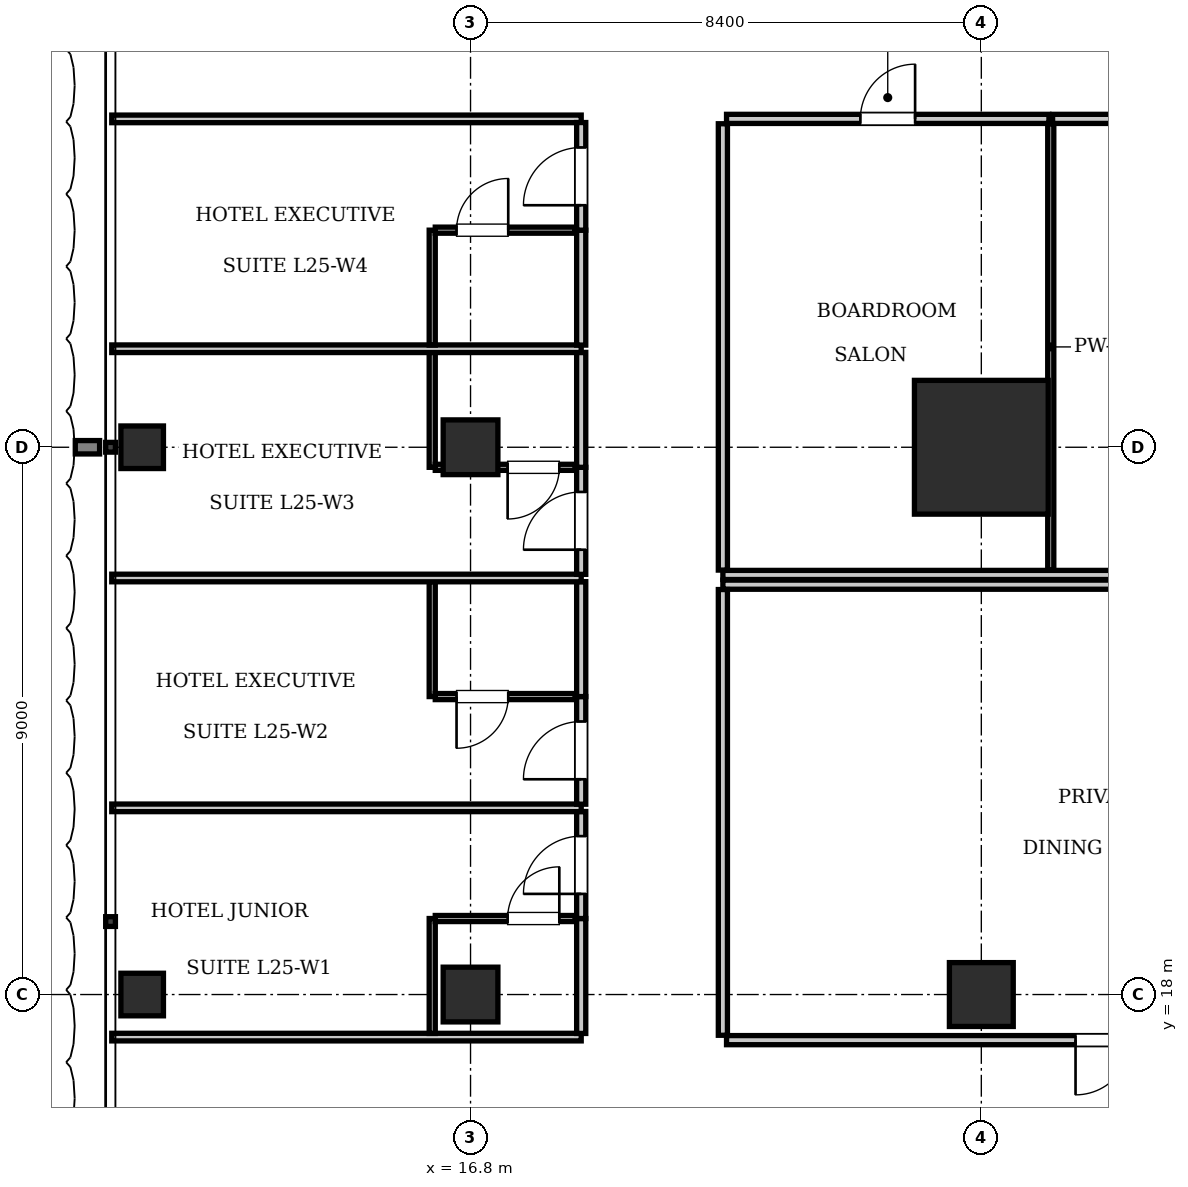
"""IFC4 building model, lengths in metres.
Left out: names, types, materials, properties, quantities, classifications, styles, units other than length and angle.
Written with IfcOpenShell. Run it as: python <this file> out.ifc"""

import sys

from ifc_helpers import new_model, si_unit, direction, frame, frame_2d, origin, origin_2d, place, context, subcontext, project, spatial, rectangle, i_section, extrude, element, fill, save


model = new_model("IFC4")
c1 = context("Model", 3, precision=1e-05, world=origin(), true_north=direction((0.0, 1.0)))
c2 = subcontext(c1, "Body", "Model", "MODEL_VIEW")
j1 = project(units=[si_unit("LENGTHUNIT", "METRE"), si_unit("PLANEANGLEUNIT", "RADIAN")], contexts=[c1])
p1 = place(None, origin())
s1 = spatial("IfcSite", under=j1, at=p1, CompositionType="ELEMENT")
p2 = place(p1, origin())
s2 = spatial("IfcBuilding", under=s1, at=p2, CompositionType="ELEMENT")
p3 = place(p2, frame((0.0, 0.0, 103.95)))
s3 = spatial("IfcBuildingStorey", under=s2, at=p3, CompositionType="ELEMENT", Elevation=103.95)
p4 = place(p3, frame((25.2, 27.0, 0.0), z_axis=(0.0, 0.0, 1.0), x_axis=(1.0, 0.0, 0.0)))
e1 = element("IfcColumn", 1, at=p4, inside=s3, PredefinedType="COLUMN", context=c2, shape_type="SweptSolid", body=[
    extrude(rectangle(XDim=2.2, YDim=2.2, at=origin_2d()), origin(), (0.0, 0.0, 1.0), 3.85),
])
p5 = place(p3, frame((25.2, 18.0, 0.0), z_axis=(0.0, 0.0, 1.0), x_axis=(1.0, 0.0, 0.0)))
e2 = element("IfcColumn", 2, at=p5, inside=s3, PredefinedType="COLUMN", context=c2, shape_type="SweptSolid", body=[
    extrude(rectangle(XDim=1.05, YDim=1.05, at=origin_2d()), origin(), (0.0, 0.0, 1.0), 3.85),
])
for number, where, z_axis, x_axis in (
    (3, (16.8, 18.0, 0.0), (0.0, 0.0, 1.0), (1.0, 0.0, 0.0)),
    (4, (16.8, 27.0, 0.0), (0.0, 0.0, 1.0), (1.0, 0.0, 0.0)),
):
    element("IfcColumn", number, at=place(p3, frame(where, z_axis=z_axis, x_axis=x_axis)), inside=s3, PredefinedType="COLUMN", context=c2, shape_type="SweptSolid", body=[
        extrude(rectangle(XDim=0.9, YDim=0.9, at=origin_2d()), origin(), (0.0, 0.0, 1.0), 3.85),
    ])
for number, where, z_axis, x_axis in (
    (5, (11.4, 18.0, 0.0), (0.0, 0.0, 1.0), (1.0, 0.0, 0.0)),
    (6, (11.4, 27.0, 0.0), (0.0, 0.0, 1.0), (1.0, 0.0, 0.0)),
):
    element("IfcColumn", number, at=place(p3, frame(where, z_axis=z_axis, x_axis=x_axis)), inside=s3, PredefinedType="COLUMN", context=c2, shape_type="SweptSolid", body=[
        extrude(i_section(OverallWidth=0.7, OverallDepth=0.7, WebThickness=0.028, FlangeThickness=0.044, at=origin_2d()), origin(), (0.0, 0.0, 1.0), 3.85),
    ])
p6 = place(p3, frame((20.95, 24.9, 0.0), z_axis=(0.0, 0.0, 1.0), x_axis=(1.0, 0.0, 0.0)))
e7 = element("IfcWall", 7, at=p6, inside=s3, PredefinedType="PARTITIONING", context=c2, shape_type="SweptSolid", body=[
    extrude(rectangle(XDim=33.7, YDim=0.15, at=frame_2d((16.85, 0.0))), origin(), (0.0, 0.0, 1.0), 3.61),
])
p7 = place(p3, frame((20.95, 24.98, 0.0), z_axis=(0.0, 0.0, 1.0), x_axis=(0.0, 1.0, 0.0)))
e8 = element("IfcWall", 8, at=p7, inside=s3, PredefinedType="PARTITIONING", context=c2, shape_type="SweptSolid", body=[
    extrude(rectangle(XDim=7.34, YDim=0.15, at=frame_2d((3.67, 0.0))), origin(), (0.0, 0.0, 1.0), 3.293),
])
p8 = place(p3, frame((21.01, 32.4, 0.0), z_axis=(0.0, 0.0, 1.0), x_axis=(1.0, 0.0, 0.0)))
e9 = element("IfcWall", 9, at=p8, inside=s3, PredefinedType="PARTITIONING", context=c2, shape_type="SweptSolid", body=[
    extrude(rectangle(XDim=5.302, YDim=0.15, at=frame_2d((2.651, 0.0))), origin(), (0.0, 0.0, 1.0), 3.61),
])
p9 = place(p8, frame((2.201, 0.0, 0.0)))
e10 = element("IfcOpeningElement", 10, at=p9, cuts=e9, PredefinedType="OPENING", context=c2, shape_type="SweptSolid", body=[
    extrude(rectangle(XDim=0.9, YDim=2.1, at=frame_2d((0.45, 1.05))), frame((0.0, 0.085, 0.0), z_axis=(0.0, -1.0, 0.0), x_axis=(1.0, 0.0, 0.0)), (0.0, 0.0, 1.0), 0.17),
])
p10 = place(p3, frame((26.342, 24.98, 0.0), z_axis=(0.0, 0.0, 1.0), x_axis=(0.0, 1.0, 0.0)))
e11 = element("IfcWall", 11, at=p10, inside=s3, PredefinedType="PARTITIONING", context=c2, shape_type="SweptSolid", body=[
    extrude(rectangle(XDim=7.34, YDim=0.1, at=frame_2d((3.67, 0.0))), origin(), (0.0, 0.0, 1.0), 3.61),
])
p11 = place(p3, frame((26.372, 32.4, 0.0), z_axis=(0.0, 0.0, 1.0), x_axis=(1.0, 0.0, 0.0)))
e12 = element("IfcWall", 12, at=p11, inside=s3, PredefinedType="PARTITIONING", context=c2, shape_type="SweptSolid", body=[
    extrude(rectangle(XDim=7.354, YDim=0.15, at=frame_2d((3.677, 0.0))), origin(), (0.0, 0.0, 1.0), 3.61),
])
p12 = place(p11, frame((3.227, 0.0, 0.0)))
e13 = element("IfcOpeningElement", 13, at=p12, cuts=e12, PredefinedType="OPENING", context=c2, shape_type="SweptSolid", body=[
    extrude(rectangle(XDim=0.9, YDim=2.1, at=frame_2d((0.45, 1.05))), frame((0.0, 0.085, 0.0), z_axis=(0.0, -1.0, 0.0), x_axis=(1.0, 0.0, 0.0)), (0.0, 0.0, 1.0), 0.17),
])
p13 = place(p3, frame((20.95, 24.74, 0.0), z_axis=(0.0, 0.0, 1.0), x_axis=(1.0, 0.0, 0.0)))
e14 = element("IfcWall", 14, at=p13, inside=s3, PredefinedType="PARTITIONING", context=c2, shape_type="SweptSolid", body=[
    extrude(rectangle(XDim=33.7, YDim=0.15, at=frame_2d((16.85, 0.0))), origin(), (0.0, 0.0, 1.0), 3.61),
])
p14 = place(p3, frame((20.95, 17.33, 0.0), z_axis=(0.0, 0.0, 1.0), x_axis=(0.0, 1.0, 0.0)))
e15 = element("IfcWall", 15, at=p14, inside=s3, PredefinedType="PARTITIONING", context=c2, shape_type="SweptSolid", body=[
    extrude(rectangle(XDim=7.33, YDim=0.15, at=frame_2d((3.665, 0.0))), origin(), (0.0, 0.0, 1.0), 3.255),
])
p15 = place(p3, frame((21.01, 17.25, 0.0), z_axis=(0.0, 0.0, 1.0), x_axis=(1.0, 0.0, 0.0)))
e16 = element("IfcWall", 16, at=p15, inside=s3, PredefinedType="PARTITIONING", context=c2, shape_type="SweptSolid", body=[
    extrude(rectangle(XDim=12.379, YDim=0.15, at=frame_2d((6.189, 0.0))), origin(), (0.0, 0.0, 1.0), 3.61),
])
p16 = place(p15, frame((5.74, 0.0, 0.0)))
e17 = element("IfcOpeningElement", 17, at=p16, cuts=e16, PredefinedType="OPENING", context=c2, shape_type="SweptSolid", body=[
    extrude(rectangle(XDim=0.9, YDim=2.1, at=frame_2d((0.45, 1.05))), frame((0.0, 0.085, 0.0), z_axis=(0.0, -1.0, 0.0), x_axis=(1.0, 0.0, 0.0)), (0.0, 0.0, 1.0), 0.17),
])
for number, where, z_axis, x_axis in (
    (18, (10.9, 17.3, 0.0), (0.0, 0.0, 1.0), (1.0, 0.0, 0.0)),
    (19, (10.9, 32.4, 0.0), (0.0, 0.0, 1.0), (1.0, 0.0, 0.0)),
):
    element("IfcWall", number, at=place(p3, frame(where, z_axis=z_axis, x_axis=x_axis)), inside=s3, PredefinedType="PARTITIONING", context=c2, shape_type="SweptSolid", body=[
        extrude(rectangle(XDim=7.72, YDim=0.125, at=frame_2d((3.86, 0.0))), origin(), (0.0, 0.0, 1.0), 3.61),
    ])
p17 = place(p3, frame((18.62, 17.36, 0.0), z_axis=(0.0, 0.0, 1.0), x_axis=(0.0, 1.0, 0.0)))
e20 = element("IfcWall", 20, at=p17, inside=s3, PredefinedType="PARTITIONING", context=c2, shape_type="SweptSolid", body=[
    extrude(rectangle(XDim=1.89, YDim=0.15, at=frame_2d((0.945, 0.0))), origin(), (0.0, 0.0, 1.0), 3.61),
])
p18 = place(p3, frame((18.62, 19.25, 0.0), z_axis=(0.0, 0.0, 1.0), x_axis=(0.0, 1.0, 0.0)))
e21 = element("IfcWall", 21, at=p18, inside=s3, PredefinedType="PARTITIONING", context=c2, shape_type="SweptSolid", body=[
    extrude(rectangle(XDim=1.76, YDim=0.15, at=frame_2d((0.88, 0.0))), origin(), (0.0, 0.0, 1.0), 3.61),
])
p19 = place(p18, frame((0.405, 0.0, 0.0)))
e22 = element("IfcOpeningElement", 22, at=p19, cuts=e21, PredefinedType="OPENING", context=c2, shape_type="SweptSolid", body=[
    extrude(rectangle(XDim=0.95, YDim=2.15, at=frame_2d((0.475, 1.075))), frame((0.0, 0.085, 0.0), z_axis=(0.0, -1.0, 0.0), x_axis=(1.0, 0.0, 0.0)), (0.0, 0.0, 1.0), 0.17),
])
p20 = place(p3, frame((16.17, 17.36, 0.0), z_axis=(0.0, 0.0, 1.0), x_axis=(0.0, 1.0, 0.0)))
e23 = element("IfcWall", 23, at=p20, inside=s3, PredefinedType="PARTITIONING", context=c2, shape_type="SweptSolid", body=[
    extrude(rectangle(XDim=1.89, YDim=0.1, at=frame_2d((0.945, 0.0))), origin(), (0.0, 0.0, 1.0), 3.61),
])
p21 = place(p3, frame((16.22, 19.25, 0.0), z_axis=(0.0, 0.0, 1.0), x_axis=(1.0, 0.0, 0.0)))
e24 = element("IfcWall", 24, at=p21, inside=s3, PredefinedType="PARTITIONING", context=c2, shape_type="SweptSolid", body=[
    extrude(rectangle(XDim=2.3, YDim=0.1, at=frame_2d((1.15, 0.0))), origin(), (0.0, 0.0, 1.0), 3.61),
])
p22 = place(p21, frame((1.19, 0.0, 0.0)))
e25 = element("IfcOpeningElement", 25, at=p22, cuts=e24, PredefinedType="OPENING", context=c2, shape_type="SweptSolid", body=[
    extrude(rectangle(XDim=0.85, YDim=2.1, at=frame_2d((0.425, 1.05))), frame((0.0, 0.06, 0.0), z_axis=(0.0, -1.0, 0.0), x_axis=(1.0, 0.0, 0.0)), (0.0, 0.0, 1.0), 0.12),
])
p23 = place(p3, frame((10.9, 21.07, 0.0), z_axis=(0.0, 0.0, 1.0), x_axis=(1.0, 0.0, 0.0)))
e26 = element("IfcWall", 26, at=p23, inside=s3, PredefinedType="PARTITIONING", context=c2, shape_type="SweptSolid", body=[
    extrude(rectangle(XDim=7.72, YDim=0.125, at=frame_2d((3.86, 0.0))), origin(), (0.0, 0.0, 1.0), 3.61),
])
p24 = place(p3, frame((18.62, 21.13, 0.0), z_axis=(0.0, 0.0, 1.0), x_axis=(0.0, 1.0, 0.0)))
e27 = element("IfcWall", 27, at=p24, inside=s3, PredefinedType="PARTITIONING", context=c2, shape_type="SweptSolid", body=[
    extrude(rectangle(XDim=1.77, YDim=0.15, at=frame_2d((0.885, 0.0))), origin(), (0.0, 0.0, 1.0), 3.61),
])
p25 = place(p24, frame((0.41, 0.0, 0.0)))
e28 = element("IfcOpeningElement", 28, at=p25, cuts=e27, PredefinedType="OPENING", context=c2, shape_type="SweptSolid", body=[
    extrude(rectangle(XDim=0.95, YDim=2.15, at=frame_2d((0.475, 1.075))), frame((0.0, 0.085, 0.0), z_axis=(0.0, -1.0, 0.0), x_axis=(1.0, 0.0, 0.0)), (0.0, 0.0, 1.0), 0.17),
])
p26 = place(p3, frame((18.62, 22.9, 0.0), z_axis=(0.0, 0.0, 1.0), x_axis=(0.0, 1.0, 0.0)))
e29 = element("IfcWall", 29, at=p26, inside=s3, PredefinedType="PARTITIONING", context=c2, shape_type="SweptSolid", body=[
    extrude(rectangle(XDim=1.89, YDim=0.15, at=frame_2d((0.945, 0.0))), origin(), (0.0, 0.0, 1.0), 3.61),
])
p27 = place(p3, frame((16.17, 22.9, 0.0), z_axis=(0.0, 0.0, 1.0), x_axis=(0.0, 1.0, 0.0)))
e30 = element("IfcWall", 30, at=p27, inside=s3, PredefinedType="PARTITIONING", context=c2, shape_type="SweptSolid", body=[
    extrude(rectangle(XDim=1.89, YDim=0.1, at=frame_2d((0.945, 0.0))), origin(), (0.0, 0.0, 1.0), 3.61),
])
p28 = place(p3, frame((16.22, 22.9, 0.0), z_axis=(0.0, 0.0, 1.0), x_axis=(1.0, 0.0, 0.0)))
e31 = element("IfcWall", 31, at=p28, inside=s3, PredefinedType="PARTITIONING", context=c2, shape_type="SweptSolid", body=[
    extrude(rectangle(XDim=2.3, YDim=0.1, at=frame_2d((1.15, 0.0))), origin(), (0.0, 0.0, 1.0), 3.61),
])
p29 = place(p28, frame((0.35, 0.0, 0.0)))
e32 = element("IfcOpeningElement", 32, at=p29, cuts=e31, PredefinedType="OPENING", context=c2, shape_type="SweptSolid", body=[
    extrude(rectangle(XDim=0.85, YDim=2.1, at=frame_2d((0.425, 1.05))), frame((0.0, 0.06, 0.0), z_axis=(0.0, -1.0, 0.0), x_axis=(1.0, 0.0, 0.0)), (0.0, 0.0, 1.0), 0.12),
])
p30 = place(p3, frame((10.9, 24.85, 0.0), z_axis=(0.0, 0.0, 1.0), x_axis=(1.0, 0.0, 0.0)))
e33 = element("IfcWall", 33, at=p30, inside=s3, PredefinedType="PARTITIONING", context=c2, shape_type="SweptSolid", body=[
    extrude(rectangle(XDim=7.72, YDim=0.125, at=frame_2d((3.86, 0.0))), origin(), (0.0, 0.0, 1.0), 3.61),
])
p31 = place(p3, frame((18.62, 24.91, 0.0), z_axis=(0.0, 0.0, 1.0), x_axis=(0.0, 1.0, 0.0)))
e34 = element("IfcWall", 34, at=p31, inside=s3, PredefinedType="PARTITIONING", context=c2, shape_type="SweptSolid", body=[
    extrude(rectangle(XDim=1.76, YDim=0.15, at=frame_2d((0.88, 0.0))), origin(), (0.0, 0.0, 1.0), 3.61),
])
p32 = place(p31, frame((0.405, 0.0, 0.0)))
e35 = element("IfcOpeningElement", 35, at=p32, cuts=e34, PredefinedType="OPENING", context=c2, shape_type="SweptSolid", body=[
    extrude(rectangle(XDim=0.95, YDim=2.15, at=frame_2d((0.475, 1.075))), frame((0.0, 0.085, 0.0), z_axis=(0.0, -1.0, 0.0), x_axis=(1.0, 0.0, 0.0)), (0.0, 0.0, 1.0), 0.17),
])
p33 = place(p3, frame((18.62, 26.67, 0.0), z_axis=(0.0, 0.0, 1.0), x_axis=(0.0, 1.0, 0.0)))
e36 = element("IfcWall", 36, at=p33, inside=s3, PredefinedType="PARTITIONING", context=c2, shape_type="SweptSolid", body=[
    extrude(rectangle(XDim=1.89, YDim=0.15, at=frame_2d((0.945, 0.0))), origin(), (0.0, 0.0, 1.0), 3.61),
])
p34 = place(p3, frame((16.17, 26.67, 0.0), z_axis=(0.0, 0.0, 1.0), x_axis=(0.0, 1.0, 0.0)))
e37 = element("IfcWall", 37, at=p34, inside=s3, PredefinedType="PARTITIONING", context=c2, shape_type="SweptSolid", body=[
    extrude(rectangle(XDim=1.89, YDim=0.1, at=frame_2d((0.945, 0.0))), origin(), (0.0, 0.0, 1.0), 3.61),
])
p35 = place(p3, frame((16.22, 26.67, 0.0), z_axis=(0.0, 0.0, 1.0), x_axis=(1.0, 0.0, 0.0)))
e38 = element("IfcWall", 38, at=p35, inside=s3, PredefinedType="PARTITIONING", context=c2, shape_type="SweptSolid", body=[
    extrude(rectangle(XDim=2.3, YDim=0.1, at=frame_2d((1.15, 0.0))), origin(), (0.0, 0.0, 1.0), 3.61),
])
p36 = place(p35, frame((1.19, 0.0, 0.0)))
e39 = element("IfcOpeningElement", 39, at=p36, cuts=e38, PredefinedType="OPENING", context=c2, shape_type="SweptSolid", body=[
    extrude(rectangle(XDim=0.85, YDim=2.1, at=frame_2d((0.425, 1.05))), frame((0.0, 0.06, 0.0), z_axis=(0.0, -1.0, 0.0), x_axis=(1.0, 0.0, 0.0)), (0.0, 0.0, 1.0), 0.12),
])
p37 = place(p3, frame((10.9, 28.62, 0.0), z_axis=(0.0, 0.0, 1.0), x_axis=(1.0, 0.0, 0.0)))
e40 = element("IfcWall", 40, at=p37, inside=s3, PredefinedType="PARTITIONING", context=c2, shape_type="SweptSolid", body=[
    extrude(rectangle(XDim=7.72, YDim=0.125, at=frame_2d((3.86, 0.0))), origin(), (0.0, 0.0, 1.0), 3.61),
])
p38 = place(p3, frame((18.62, 28.68, 0.0), z_axis=(0.0, 0.0, 1.0), x_axis=(0.0, 1.0, 0.0)))
e41 = element("IfcWall", 41, at=p38, inside=s3, PredefinedType="PARTITIONING", context=c2, shape_type="SweptSolid", body=[
    extrude(rectangle(XDim=1.89, YDim=0.15, at=frame_2d((0.945, 0.0))), origin(), (0.0, 0.0, 1.0), 3.61),
])
p39 = place(p3, frame((18.62, 30.57, 0.0), z_axis=(0.0, 0.0, 1.0), x_axis=(0.0, 1.0, 0.0)))
e42 = element("IfcWall", 42, at=p39, inside=s3, PredefinedType="PARTITIONING", context=c2, shape_type="SweptSolid", body=[
    extrude(rectangle(XDim=1.77, YDim=0.15, at=frame_2d((0.885, 0.0))), origin(), (0.0, 0.0, 1.0), 3.61),
])
p40 = place(p39, frame((0.41, 0.0, 0.0)))
e43 = element("IfcOpeningElement", 43, at=p40, cuts=e42, PredefinedType="OPENING", context=c2, shape_type="SweptSolid", body=[
    extrude(rectangle(XDim=0.95, YDim=2.15, at=frame_2d((0.475, 1.075))), frame((0.0, 0.085, 0.0), z_axis=(0.0, -1.0, 0.0), x_axis=(1.0, 0.0, 0.0)), (0.0, 0.0, 1.0), 0.17),
])
p41 = place(p3, frame((16.17, 28.68, 0.0), z_axis=(0.0, 0.0, 1.0), x_axis=(0.0, 1.0, 0.0)))
e44 = element("IfcWall", 44, at=p41, inside=s3, PredefinedType="PARTITIONING", context=c2, shape_type="SweptSolid", body=[
    extrude(rectangle(XDim=1.89, YDim=0.1, at=frame_2d((0.945, 0.0))), origin(), (0.0, 0.0, 1.0), 3.61),
])
p42 = place(p3, frame((16.22, 30.57, 0.0), z_axis=(0.0, 0.0, 1.0), x_axis=(1.0, 0.0, 0.0)))
e45 = element("IfcWall", 45, at=p42, inside=s3, PredefinedType="PARTITIONING", context=c2, shape_type="SweptSolid", body=[
    extrude(rectangle(XDim=2.3, YDim=0.1, at=frame_2d((1.15, 0.0))), origin(), (0.0, 0.0, 1.0), 3.61),
])
p43 = place(p42, frame((0.35, 0.0, 0.0)))
e46 = element("IfcOpeningElement", 46, at=p43, cuts=e45, PredefinedType="OPENING", context=c2, shape_type="SweptSolid", body=[
    extrude(rectangle(XDim=0.85, YDim=2.1, at=frame_2d((0.425, 1.05))), frame((0.0, 0.06, 0.0), z_axis=(0.0, -1.0, 0.0), x_axis=(1.0, 0.0, 0.0)), (0.0, 0.0, 1.0), 0.12),
])
p44 = place(p9, origin())
e47 = element("IfcDoor", 47, at=p44, inside=s3, OperationType="SINGLE_SWING_RIGHT", PredefinedType="DOOR", context=c2, shape_type="SweptSolid", body=[
    extrude(rectangle(XDim=0.9, YDim=2.1, at=frame_2d((0.45, 1.05))), frame((0.0, 0.025, 0.0), z_axis=(0.0, -1.0, 0.0), x_axis=(1.0, 0.0, 0.0)), (0.0, 0.0, 1.0), 0.05),
])
fill(e10, e47)
p45 = place(p16, frame((0.9, 0.0, 0.0), z_axis=(0.0, 0.0, 1.0), x_axis=(-1.0, 0.0, 0.0)))
e48 = element("IfcDoor", 48, at=p45, inside=s3, OperationType="SINGLE_SWING_RIGHT", PredefinedType="DOOR", context=c2, shape_type="SweptSolid", body=[
    extrude(rectangle(XDim=0.9, YDim=2.1, at=frame_2d((0.45, 1.05))), frame((0.0, 0.025, 0.0), z_axis=(0.0, -1.0, 0.0), x_axis=(1.0, 0.0, 0.0)), (0.0, 0.0, 1.0), 0.05),
])
fill(e17, e48)
p46 = place(p22, origin())
e49 = element("IfcDoor", 49, at=p46, inside=s3, OperationType="SINGLE_SWING_RIGHT", PredefinedType="DOOR", context=c2, shape_type="SweptSolid", body=[
    extrude(rectangle(XDim=0.85, YDim=2.1, at=frame_2d((0.425, 1.05))), frame((0.0, 0.025, 0.0), z_axis=(0.0, -1.0, 0.0), x_axis=(1.0, 0.0, 0.0)), (0.0, 0.0, 1.0), 0.05),
])
fill(e25, e49)
p47 = place(p19, origin())
e50 = element("IfcDoor", 50, at=p47, inside=s3, OperationType="SINGLE_SWING_LEFT", PredefinedType="DOOR", context=c2, shape_type="SweptSolid", body=[
    extrude(rectangle(XDim=0.95, YDim=2.15, at=frame_2d((0.475, 1.075))), frame((0.0, 0.025, 0.0), z_axis=(0.0, -1.0, 0.0), x_axis=(1.0, 0.0, 0.0)), (0.0, 0.0, 1.0), 0.05),
])
fill(e22, e50)
p48 = place(p29, frame((0.85, 0.0, 0.0), z_axis=(0.0, 0.0, 1.0), x_axis=(-1.0, 0.0, 0.0)))
e51 = element("IfcDoor", 51, at=p48, inside=s3, OperationType="SINGLE_SWING_RIGHT", PredefinedType="DOOR", context=c2, shape_type="SweptSolid", body=[
    extrude(rectangle(XDim=0.85, YDim=2.1, at=frame_2d((0.425, 1.05))), frame((0.0, 0.025, 0.0), z_axis=(0.0, -1.0, 0.0), x_axis=(1.0, 0.0, 0.0)), (0.0, 0.0, 1.0), 0.05),
])
fill(e32, e51)
p49 = place(p25, origin())
e52 = element("IfcDoor", 52, at=p49, inside=s3, OperationType="SINGLE_SWING_LEFT", PredefinedType="DOOR", context=c2, shape_type="SweptSolid", body=[
    extrude(rectangle(XDim=0.95, YDim=2.15, at=frame_2d((0.475, 1.075))), frame((0.0, 0.025, 0.0), z_axis=(0.0, -1.0, 0.0), x_axis=(1.0, 0.0, 0.0)), (0.0, 0.0, 1.0), 0.05),
])
fill(e28, e52)
p50 = place(p36, frame((0.85, 0.0, 0.0), z_axis=(0.0, 0.0, 1.0), x_axis=(-1.0, 0.0, 0.0)))
e53 = element("IfcDoor", 53, at=p50, inside=s3, OperationType="SINGLE_SWING_RIGHT", PredefinedType="DOOR", context=c2, shape_type="SweptSolid", body=[
    extrude(rectangle(XDim=0.85, YDim=2.1, at=frame_2d((0.425, 1.05))), frame((0.0, 0.025, 0.0), z_axis=(0.0, -1.0, 0.0), x_axis=(1.0, 0.0, 0.0)), (0.0, 0.0, 1.0), 0.05),
])
fill(e39, e53)
p51 = place(p32, origin())
e54 = element("IfcDoor", 54, at=p51, inside=s3, OperationType="SINGLE_SWING_LEFT", PredefinedType="DOOR", context=c2, shape_type="SweptSolid", body=[
    extrude(rectangle(XDim=0.95, YDim=2.15, at=frame_2d((0.475, 1.075))), frame((0.0, 0.025, 0.0), z_axis=(0.0, -1.0, 0.0), x_axis=(1.0, 0.0, 0.0)), (0.0, 0.0, 1.0), 0.05),
])
fill(e35, e54)
p52 = place(p43, origin())
e55 = element("IfcDoor", 55, at=p52, inside=s3, OperationType="SINGLE_SWING_RIGHT", PredefinedType="DOOR", context=c2, shape_type="SweptSolid", body=[
    extrude(rectangle(XDim=0.85, YDim=2.1, at=frame_2d((0.425, 1.05))), frame((0.0, 0.025, 0.0), z_axis=(0.0, -1.0, 0.0), x_axis=(1.0, 0.0, 0.0)), (0.0, 0.0, 1.0), 0.05),
])
fill(e46, e55)
p53 = place(p40, origin())
e56 = element("IfcDoor", 56, at=p53, inside=s3, OperationType="SINGLE_SWING_LEFT", PredefinedType="DOOR", context=c2, shape_type="SweptSolid", body=[
    extrude(rectangle(XDim=0.95, YDim=2.15, at=frame_2d((0.475, 1.075))), frame((0.0, 0.025, 0.0), z_axis=(0.0, -1.0, 0.0), x_axis=(1.0, 0.0, 0.0)), (0.0, 0.0, 1.0), 0.05),
])
fill(e43, e56)
save(model, sys.argv[1])
